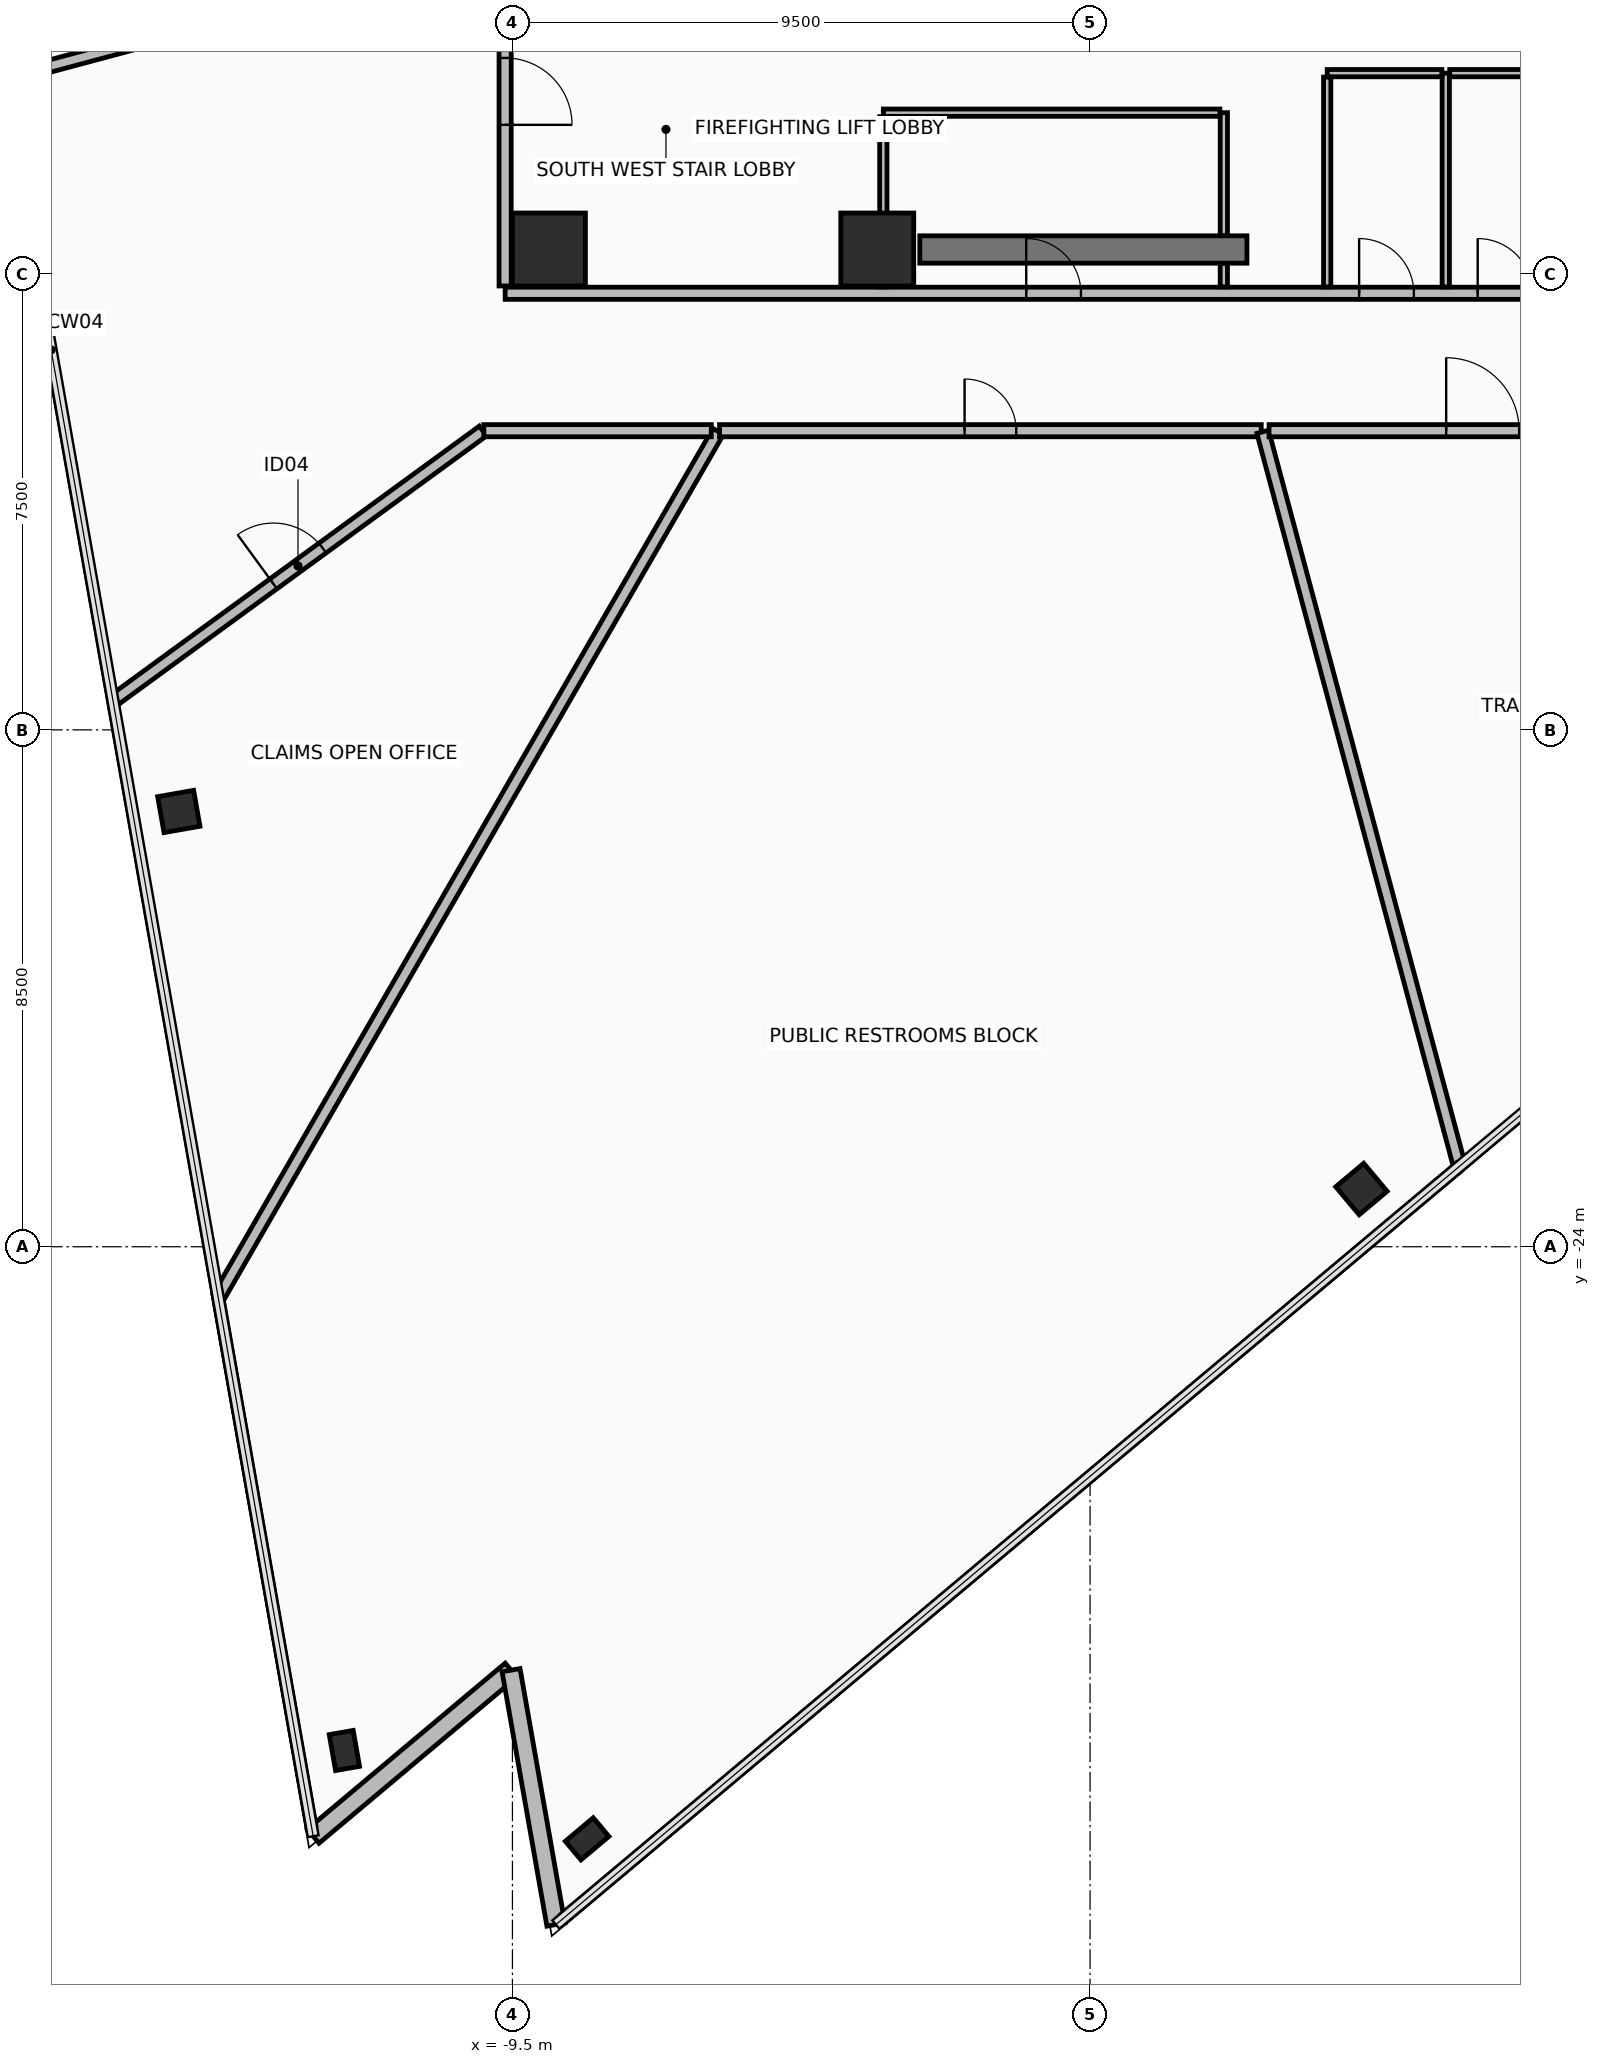
"""IFC4 building model, lengths in metres.
Left out: names, types, materials, properties, quantities, classifications, styles, units other than length and angle.
Written with IfcOpenShell. Run it as: python <this file> out.ifc"""

import sys

from ifc_helpers import new_model, si_unit, direction, frame, frame_2d, origin, origin_2d, place, context, subcontext, project, spatial, rectangle, hollow_rectangle, extrude, element, fill, save


model = new_model("IFC4")
c1 = context("Model", 3, precision=1e-05, world=origin(), true_north=direction((0.0, 1.0)))
c2 = subcontext(c1, "Body", "Model", "MODEL_VIEW")
j1 = project(units=[si_unit("LENGTHUNIT", "METRE"), si_unit("PLANEANGLEUNIT", "RADIAN")], contexts=[c1])
p1 = place(None, origin())
s1 = spatial("IfcSite", under=j1, at=p1, CompositionType="ELEMENT")
p2 = place(p1, origin())
s2 = spatial("IfcBuilding", under=s1, at=p2, CompositionType="ELEMENT")
p3 = place(p2, frame((0.0, 0.0, 177.7)))
s3 = spatial("IfcBuildingStorey", under=s2, at=p3, CompositionType="ELEMENT", Elevation=177.7)
for number, where, z_axis, x_axis in (
    (1, (-8.9, -7.6, 0.0), (0.0, 0.0, 1.0), (1.0, 0.0, 0.0)),
    (2, (-3.5, -7.6, 0.0), (0.0, 0.0, 1.0), (1.0, 0.0, 0.0)),
):
    element("IfcColumn", number, at=place(p3, frame(where, z_axis=z_axis, x_axis=x_axis)), inside=s3, PredefinedType="COLUMN", context=c2, shape_type="SweptSolid", body=[
        extrude(rectangle(XDim=1.2, YDim=1.2, at=origin_2d()), origin(), (0.0, 0.0, 1.0), 3.6),
    ])
p4 = place(p3, frame((-14.987, -16.842, 0.0), z_axis=(0.0, 0.0, 1.0), x_axis=(-0.173648177667, 0.984807753012, 0.0)))
e3 = element("IfcColumn", 3, at=p4, inside=s3, PredefinedType="COLUMN", context=c2, shape_type="SweptSolid", body=[
    extrude(hollow_rectangle(XDim=0.6, YDim=0.6, WallThickness=0.036, at=origin_2d()), origin(), (0.0, 0.0, 1.0), 3.6),
])
for number, where, z_axis, x_axis in (
    (4, (-12.264, -32.284, 0.0), (0.0, 0.0, 1.0), (-0.174, 0.985, 0.0)),
    (5, (-8.272, -33.737, 0.0), (0.0, 0.0, 1.0), (0.766, 0.643, 0.0)),
):
    element("IfcColumn", number, at=place(p3, frame(where, z_axis=z_axis, x_axis=x_axis)), inside=s3, PredefinedType="COLUMN", context=c2, shape_type="SweptSolid", body=[
        extrude(hollow_rectangle(XDim=0.4, YDim=0.6, WallThickness=0.03, at=origin_2d()), origin(), (0.0, 0.0, 1.0), 3.6),
    ])
p5 = place(p3, frame((4.463, -23.051, 0.0), z_axis=(0.0, 0.0, 1.0), x_axis=(0.766043321242, 0.642788946685, 0.0)))
e6 = element("IfcColumn", 6, at=p5, inside=s3, PredefinedType="COLUMN", context=c2, shape_type="SweptSolid", body=[
    extrude(hollow_rectangle(XDim=0.6, YDim=0.6, WallThickness=0.036, at=origin_2d()), origin(), (0.0, 0.0, 1.0), 3.6),
])
for number, where, z_axis, x_axis in (
    (7, (-12.777, -33.694, 0.0), (0.0, 0.0, 1.0), (0.766, 0.643, 0.0)),
    (8, (-9.523, -30.963, 0.0), (0.0, 0.0, 1.0), (0.174, -0.985, 0.0)),
):
    element("IfcWall", number, at=place(p3, frame(where, z_axis=z_axis, x_axis=x_axis)), inside=s3, PredefinedType="STANDARD", context=c2, shape_type="SweptSolid", body=[
        extrude(rectangle(XDim=4.248, YDim=0.3, at=frame_2d((2.124, 0.0))), origin(), (0.0, 0.0, 1.0), 2.715),
    ])
p6 = place(p3, frame((-2.8, -7.6, 0.0), z_axis=(0.0, 0.0, 1.0), x_axis=(1.0, 0.0, 0.0)))
e9 = element("IfcWall", 9, at=p6, inside=s3, PredefinedType="SHEAR", context=c2, shape_type="SweptSolid", body=[
    extrude(rectangle(XDim=5.38, YDim=0.45, at=frame_2d((2.69, 0.0))), origin(), (0.0, 0.0, 1.0), 3.42),
])
p7 = place(p3, frame((-9.62, -8.32, 0.0), z_axis=(0.0, 0.0, 1.0), x_axis=(1.0, 0.0, 0.0)))
e10 = element("IfcWall", 10, at=p7, inside=s3, PredefinedType="PARTITIONING", context=c2, shape_type="SweptSolid", body=[
    extrude(rectangle(XDim=19.24, YDim=0.2, at=frame_2d((9.62, 0.0))), origin(), (0.0, 0.0, 1.0), 2.865),
])
p8 = place(p7, frame((8.57, 0.0, 0.0)))
e11 = element("IfcOpeningElement", 11, at=p8, cuts=e10, PredefinedType="OPENING", context=c2, shape_type="SweptSolid", body=[
    extrude(rectangle(XDim=0.9, YDim=2.1, at=frame_2d((0.45, 1.05))), frame((0.0, 0.11, 0.0), z_axis=(0.0, -1.0, 0.0), x_axis=(1.0, 0.0, 0.0)), (0.0, 0.0, 1.0), 0.22),
])
p9 = place(p7, frame((14.045, 0.0, 0.0)))
e12 = element("IfcOpeningElement", 12, at=p9, cuts=e10, PredefinedType="OPENING", context=c2, shape_type="SweptSolid", body=[
    extrude(rectangle(XDim=0.9, YDim=2.1, at=frame_2d((0.45, 1.05))), frame((0.0, 0.11, 0.0), z_axis=(0.0, -1.0, 0.0), x_axis=(1.0, 0.0, 0.0)), (0.0, 0.0, 1.0), 0.22),
])
p10 = place(p7, frame((15.995, 0.0, 0.0)))
e13 = element("IfcOpeningElement", 13, at=p10, cuts=e10, PredefinedType="OPENING", context=c2, shape_type="SweptSolid", body=[
    extrude(rectangle(XDim=0.9, YDim=2.1, at=frame_2d((0.45, 1.05))), frame((0.0, 0.11, 0.0), z_axis=(0.0, -1.0, 0.0), x_axis=(1.0, 0.0, 0.0)), (0.0, 0.0, 1.0), 0.22),
])
p11 = place(p3, frame((-9.62, 8.2, 0.0), z_axis=(0.0, 0.0, 1.0), x_axis=(0.0, -1.0, 0.0)))
e14 = element("IfcWall", 14, at=p11, inside=s3, PredefinedType="PARTITIONING", context=c2, shape_type="SweptSolid", body=[
    extrude(rectangle(XDim=16.4, YDim=0.2, at=frame_2d((8.2, 0.0))), origin(), (0.0, 0.0, 1.0), 2.765),
])
p12 = place(p11, frame((12.65, 0.0, 0.0)))
e15 = element("IfcOpeningElement", 15, at=p12, cuts=e14, PredefinedType="OPENING", context=c2, shape_type="SweptSolid", body=[
    extrude(rectangle(XDim=1.1, YDim=2.15, at=frame_2d((0.55, 1.075))), frame((0.0, 0.11, 0.0), z_axis=(0.0, -1.0, 0.0), x_axis=(1.0, 0.0, 0.0)), (0.0, 0.0, 1.0), 0.22),
])
p13 = place(p3, frame((2.2, -8.215, 0.0), z_axis=(0.0, 0.0, 1.0), x_axis=(0.0, 1.0, 0.0)))
e16 = element("IfcWall", 16, at=p13, inside=s3, PredefinedType="PARTITIONING", context=c2, shape_type="SweptSolid", body=[
    extrude(rectangle(XDim=0.385, YDim=0.12, at=frame_2d((0.192, 0.0))), origin(), (0.0, 0.0, 1.0), 2.715),
])
p14 = place(p3, frame((2.2, -7.37, 0.0), z_axis=(0.0, 0.0, 1.0), x_axis=(0.0, 1.0, 0.0)))
e17 = element("IfcWall", 17, at=p14, inside=s3, PredefinedType="PARTITIONING", context=c2, shape_type="SweptSolid", body=[
    extrude(rectangle(XDim=2.02, YDim=0.12, at=frame_2d((1.01, 0.0))), origin(), (0.0, 0.0, 1.0), 2.715),
])
p15 = place(p3, frame((2.135, -5.35, 0.0), z_axis=(0.0, 0.0, 1.0), x_axis=(-1.0, 0.0, 0.0)))
e18 = element("IfcWall", 18, at=p15, inside=s3, PredefinedType="PARTITIONING", context=c2, shape_type="SweptSolid", body=[
    extrude(rectangle(XDim=5.535, YDim=0.12, at=frame_2d((2.768, 0.0))), origin(), (0.0, 0.0, 1.0), 2.715),
])
p16 = place(p3, frame((-3.4, -5.415, 0.0), z_axis=(0.0, 0.0, 1.0), x_axis=(0.0, -1.0, 0.0)))
e19 = element("IfcWall", 19, at=p16, inside=s3, PredefinedType="PARTITIONING", context=c2, shape_type="SweptSolid", body=[
    extrude(rectangle(XDim=2.8, YDim=0.12, at=frame_2d((1.4, 0.0))), origin(), (0.0, 0.0, 1.0), 2.715),
])
p17 = place(p3, frame((5.85, -8.215, 0.0), z_axis=(0.0, 0.0, 1.0), x_axis=(0.0, 1.0, 0.0)))
e20 = element("IfcWall", 20, at=p17, inside=s3, PredefinedType="PARTITIONING", context=c2, shape_type="SweptSolid", body=[
    extrude(rectangle(XDim=3.515, YDim=0.12, at=frame_2d((1.758, 0.0))), origin(), (0.0, 0.0, 1.0), 2.715),
])
p18 = place(p3, frame((5.785, -4.7, 0.0), z_axis=(0.0, 0.0, 1.0), x_axis=(-1.0, 0.0, 0.0)))
e21 = element("IfcWall", 21, at=p18, inside=s3, PredefinedType="PARTITIONING", context=c2, shape_type="SweptSolid", body=[
    extrude(rectangle(XDim=1.885, YDim=0.12, at=frame_2d((0.942, 0.0))), origin(), (0.0, 0.0, 1.0), 3.42),
])
p19 = place(p3, frame((3.9, -4.765, 0.0), z_axis=(0.0, 0.0, 1.0), x_axis=(0.0, -1.0, 0.0)))
e22 = element("IfcWall", 22, at=p19, inside=s3, PredefinedType="PARTITIONING", context=c2, shape_type="SweptSolid", body=[
    extrude(rectangle(XDim=3.45, YDim=0.12, at=frame_2d((1.725, 0.0))), origin(), (0.0, 0.0, 1.0), 2.715),
])
p20 = place(p3, frame((7.735, -4.7, 0.0), z_axis=(0.0, 0.0, 1.0), x_axis=(-1.0, 0.0, 0.0)))
e23 = element("IfcWall", 23, at=p20, inside=s3, PredefinedType="PARTITIONING", context=c2, shape_type="SweptSolid", body=[
    extrude(rectangle(XDim=1.82, YDim=0.12, at=frame_2d((0.91, 0.0))), origin(), (0.0, 0.0, 1.0), 3.42),
])
p21 = place(p3, frame((-11.898, -3.188, 0.0), z_axis=(0.0, 0.0, 1.0), x_axis=(-0.965934250079, -0.258787605045, 0.0)))
e24 = element("IfcWall", 24, at=p21, inside=s3, PredefinedType="PARTITIONING", context=c2, shape_type="SweptSolid", body=[
    extrude(rectangle(XDim=6.158, YDim=0.2, at=frame_2d((3.079, 0.0))), origin(), (0.0, 0.0, 1.0), 2.715),
])
p22 = place(p3, frame((-12.808, -33.518, 0.0), z_axis=(0.0, 0.0, 1.0), x_axis=(-0.173647747775, 0.984807828814, 0.0)))
e25 = element("IfcWall", 25, at=p22, inside=s3, PredefinedType="PARTITIONING", context=c2, shape_type="SweptSolid", body=[
    extrude(rectangle(XDim=8.807, YDim=0.15, at=frame_2d((4.403, 0.0))), origin(), (0.0, 0.0, 1.0), 3.42),
])
p23 = place(p3, frame((-14.334, -24.828, 0.0), z_axis=(0.0, 0.0, 1.0), x_axis=(0.500004877517, 0.866022587731, 0.0)))
e26 = element("IfcWall", 26, at=p23, inside=s3, PredefinedType="PARTITIONING", context=c2, shape_type="SweptSolid", body=[
    extrude(rectangle(XDim=16.437, YDim=0.2, at=frame_2d((8.219, 0.0))), origin(), (0.0, 0.0, 1.0), 2.715),
])
p24 = place(p3, frame((-6.094, -10.58, 0.0), z_axis=(0.0, 0.0, 1.0), x_axis=(1.0, 0.0, 0.0)))
e27 = element("IfcWall", 27, at=p24, inside=s3, PredefinedType="PARTITIONING", context=c2, shape_type="SweptSolid", body=[
    extrude(rectangle(XDim=8.91, YDim=0.2, at=frame_2d((4.455, 0.0))), origin(), (0.0, 0.0, 1.0), 3.42),
])
p25 = place(p24, frame((4.03, 0.0, 0.0)))
e28 = element("IfcOpeningElement", 28, at=p25, cuts=e27, PredefinedType="OPENING", context=c2, shape_type="SweptSolid", body=[
    extrude(rectangle(XDim=0.85, YDim=2.1, at=frame_2d((0.425, 1.05))), frame((0.0, 0.11, 0.0), z_axis=(0.0, -1.0, 0.0), x_axis=(1.0, 0.0, 0.0)), (0.0, 0.0, 1.0), 0.22),
])
p26 = place(p3, frame((2.84, -10.598, 0.0), z_axis=(0.0, 0.0, 1.0), x_axis=(0.258817191025, -0.965926323086, 0.0)))
e29 = element("IfcWall", 29, at=p26, inside=s3, PredefinedType="PARTITIONING", context=c2, shape_type="SweptSolid", body=[
    extrude(rectangle(XDim=12.488, YDim=0.2, at=frame_2d((6.244, 0.0))), origin(), (0.0, 0.0, 1.0), 2.715),
])
p27 = place(p3, frame((6.064, -22.687, 0.0), z_axis=(0.0, 0.0, 1.0), x_axis=(-0.766045343091, -0.64278653714, 0.0)))
e30 = element("IfcWall", 30, at=p27, inside=s3, PredefinedType="PARTITIONING", context=c2, shape_type="SweptSolid", body=[
    extrude(rectangle(XDim=19.205, YDim=0.15, at=frame_2d((9.603, 0.0))), origin(), (0.0, 0.0, 1.0), 3.42),
])
p28 = place(p3, frame((-16.069, -15.024, 0.0), z_axis=(0.0, 0.0, 1.0), x_axis=(0.807835167635, 0.589408467815, 0.0)))
e31 = element("IfcWall", 31, at=p28, inside=s3, PredefinedType="PARTITIONING", context=c2, shape_type="SweptSolid", body=[
    extrude(rectangle(XDim=7.531, YDim=0.2, at=frame_2d((3.766, 0.0))), origin(), (0.0, 0.0, 1.0), 2.715),
])
p29 = place(p28, frame((3.266, 0.0, 0.0)))
e32 = element("IfcOpeningElement", 32, at=p29, cuts=e31, PredefinedType="OPENING", context=c2, shape_type="SweptSolid", body=[
    extrude(rectangle(XDim=1.0, YDim=2.15, at=frame_2d((0.5, 1.075))), frame((0.0, 0.11, 0.0), z_axis=(0.0, -1.0, 0.0), x_axis=(1.0, 0.0, 0.0)), (0.0, 0.0, 1.0), 0.22),
])
p30 = place(p3, frame((-9.97, -10.58, 0.0), z_axis=(0.0, 0.0, 1.0), x_axis=(1.0, 0.0, 0.0)))
e33 = element("IfcWall", 33, at=p30, inside=s3, PredefinedType="PARTITIONING", context=c2, shape_type="SweptSolid", body=[
    extrude(rectangle(XDim=3.74, YDim=0.2, at=frame_2d((1.87, 0.0))), origin(), (0.0, 0.0, 1.0), 2.865),
])
p31 = place(p3, frame((2.944, -10.58, 0.0), z_axis=(0.0, 0.0, 1.0), x_axis=(1.0, 0.0, 0.0)))
e34 = element("IfcWall", 34, at=p31, inside=s3, PredefinedType="PARTITIONING", context=c2, shape_type="SweptSolid", body=[
    extrude(rectangle(XDim=7.026, YDim=0.2, at=frame_2d((3.513, 0.0))), origin(), (0.0, 0.0, 1.0), 2.865),
])
p32 = place(p31, frame((2.913, 0.0, 0.0)))
e35 = element("IfcOpeningElement", 35, at=p32, cuts=e34, PredefinedType="OPENING", context=c2, shape_type="SweptSolid", body=[
    extrude(rectangle(XDim=1.2, YDim=2.15, at=frame_2d((0.6, 1.075))), frame((0.0, 0.11, 0.0), z_axis=(0.0, -1.0, 0.0), x_axis=(1.0, 0.0, 0.0)), (0.0, 0.0, 1.0), 0.22),
])
p33 = place(p12, frame((1.1, 0.0, 0.0), z_axis=(0.0, 0.0, 1.0), x_axis=(-1.0, 0.0, 0.0)))
e36 = element("IfcDoor", 36, at=p33, inside=s3, OperationType="SINGLE_SWING_LEFT", PredefinedType="DOOR", context=c2, shape_type="SweptSolid", body=[
    extrude(rectangle(XDim=1.1, YDim=2.15, at=frame_2d((0.55, 1.075))), frame((0.0, 0.025, 0.0), z_axis=(0.0, -1.0, 0.0), x_axis=(1.0, 0.0, 0.0)), (0.0, 0.0, 1.0), 0.05),
])
fill(e15, e36)
p34 = place(p8, origin())
e37 = element("IfcDoor", 37, at=p34, inside=s3, OperationType="SINGLE_SWING_LEFT", PredefinedType="DOOR", context=c2, shape_type="SweptSolid", body=[
    extrude(rectangle(XDim=0.9, YDim=2.1, at=frame_2d((0.45, 1.05))), frame((0.0, 0.025, 0.0), z_axis=(0.0, -1.0, 0.0), x_axis=(1.0, 0.0, 0.0)), (0.0, 0.0, 1.0), 0.05),
])
fill(e11, e37)
p35 = place(p9, origin())
e38 = element("IfcDoor", 38, at=p35, inside=s3, OperationType="SINGLE_SWING_LEFT", PredefinedType="DOOR", context=c2, shape_type="SweptSolid", body=[
    extrude(rectangle(XDim=0.9, YDim=2.1, at=frame_2d((0.45, 1.05))), frame((0.0, 0.025, 0.0), z_axis=(0.0, -1.0, 0.0), x_axis=(1.0, 0.0, 0.0)), (0.0, 0.0, 1.0), 0.05),
])
fill(e12, e38)
p36 = place(p10, origin())
e39 = element("IfcDoor", 39, at=p36, inside=s3, OperationType="SINGLE_SWING_LEFT", PredefinedType="DOOR", context=c2, shape_type="SweptSolid", body=[
    extrude(rectangle(XDim=0.9, YDim=2.1, at=frame_2d((0.45, 1.05))), frame((0.0, 0.025, 0.0), z_axis=(0.0, -1.0, 0.0), x_axis=(1.0, 0.0, 0.0)), (0.0, 0.0, 1.0), 0.05),
])
fill(e13, e39)
p37 = place(p25, origin())
e40 = element("IfcDoor", 40, at=p37, inside=s3, OperationType="SINGLE_SWING_RIGHT", PredefinedType="DOOR", context=c2, shape_type="SweptSolid", body=[
    extrude(rectangle(XDim=0.85, YDim=2.1, at=frame_2d((0.425, 1.05))), frame((0.0, 0.025, 0.0), z_axis=(0.0, -1.0, 0.0), x_axis=(1.0, 0.0, 0.0)), (0.0, 0.0, 1.0), 0.05),
])
fill(e28, e40)
p38 = place(p29, origin())
e41 = element("IfcDoor", 41, at=p38, inside=s3, OperationType="SINGLE_SWING_RIGHT", PredefinedType="DOOR", context=c2, shape_type="SweptSolid", body=[
    extrude(rectangle(XDim=1.0, YDim=2.15, at=frame_2d((0.5, 1.075))), frame((0.0, 0.025, 0.0), z_axis=(0.0, -1.0, 0.0), x_axis=(1.0, 0.0, 0.0)), (0.0, 0.0, 1.0), 0.05),
])
fill(e32, e41)
p39 = place(p32, origin())
e42 = element("IfcDoor", 42, at=p39, inside=s3, OperationType="SINGLE_SWING_LEFT", PredefinedType="DOOR", context=c2, shape_type="SweptSolid", body=[
    extrude(rectangle(XDim=1.2, YDim=2.15, at=frame_2d((0.6, 1.075))), frame((0.0, 0.025, 0.0), z_axis=(0.0, -1.0, 0.0), x_axis=(1.0, 0.0, 0.0)), (0.0, 0.0, 1.0), 0.05),
])
fill(e35, e42)
save(model, sys.argv[1])
